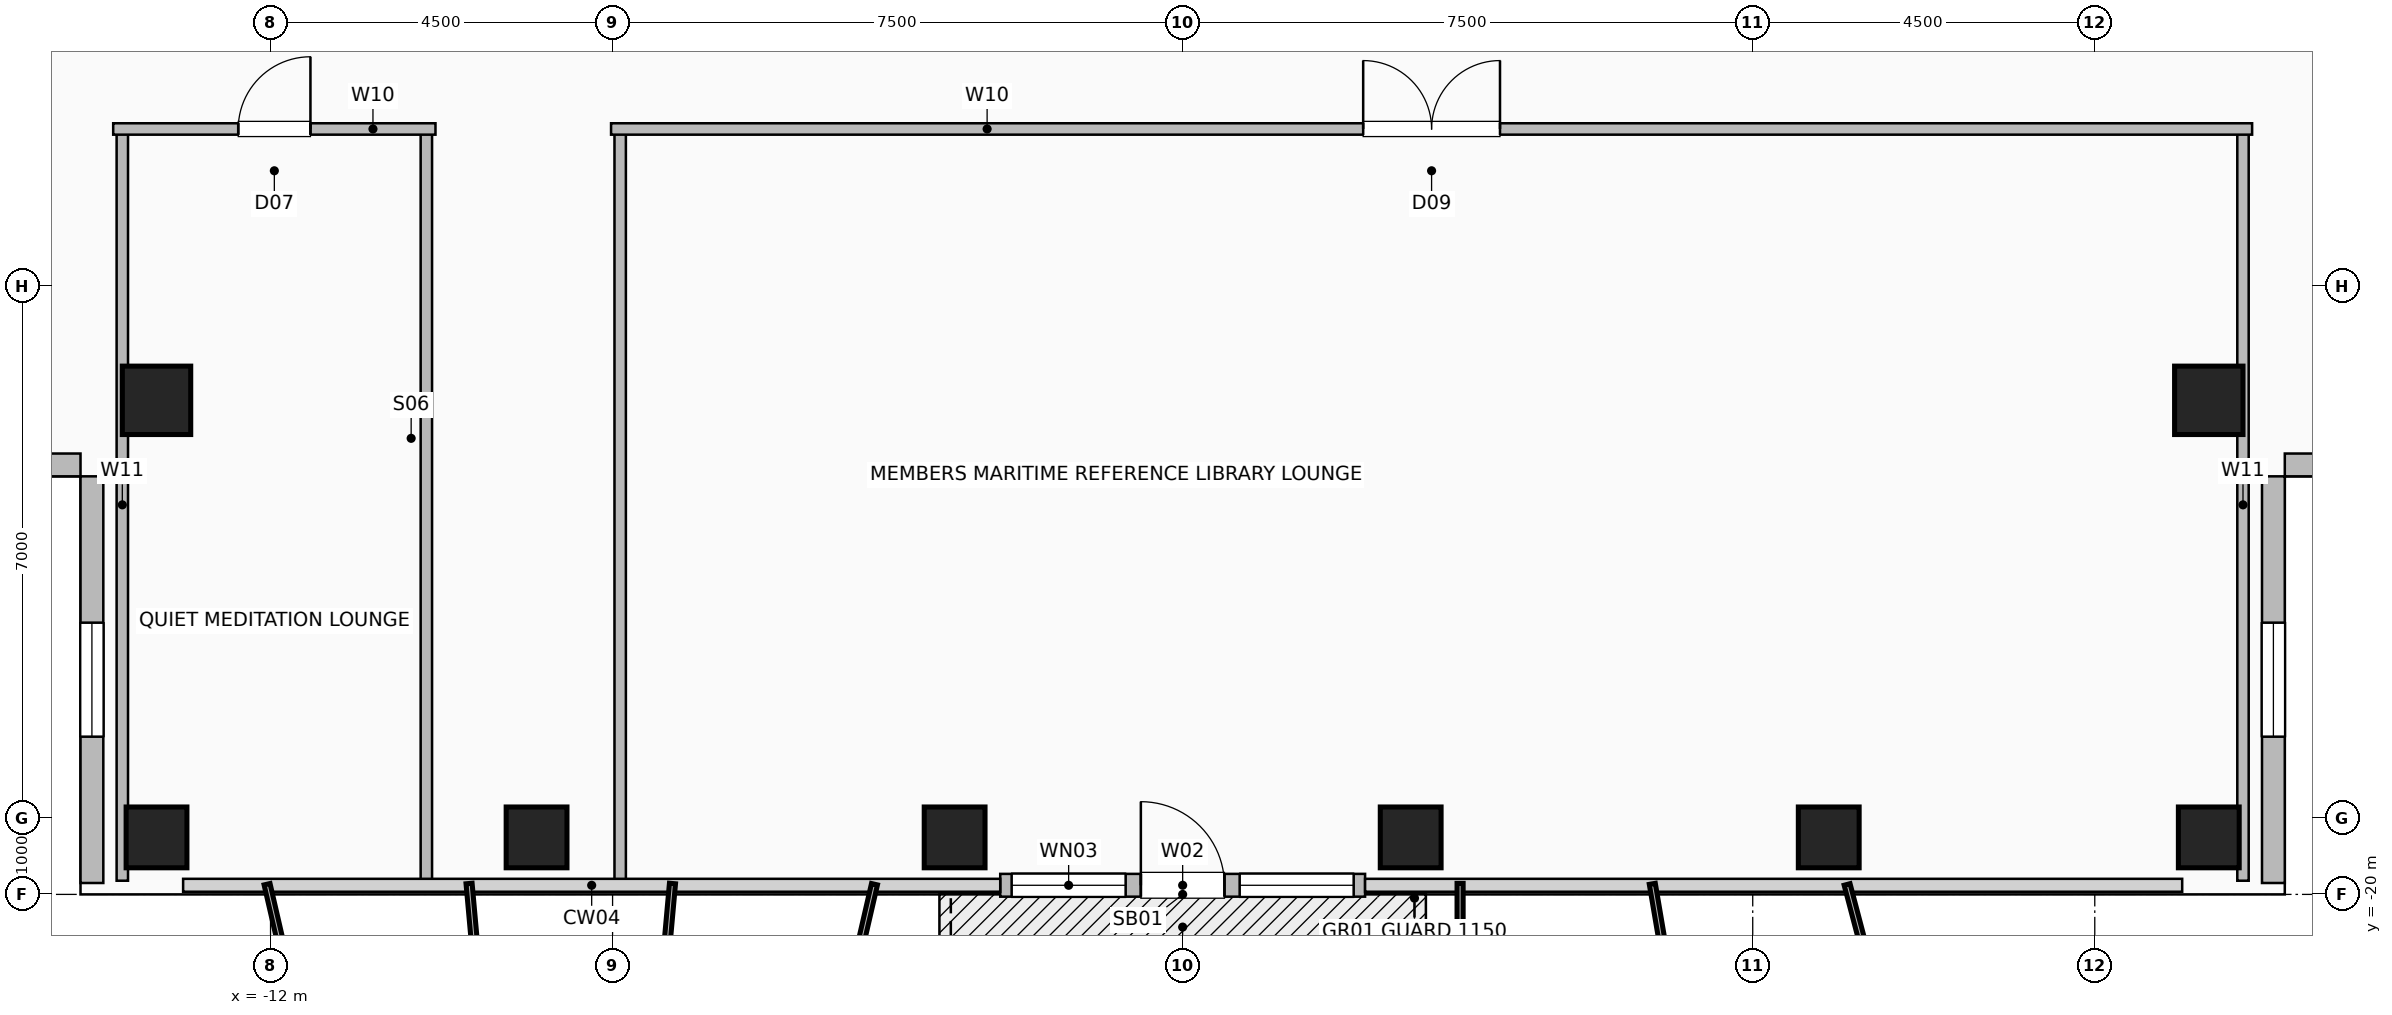
"""IFC4 building model, lengths in metres.
Left out: names, types, materials, properties, quantities, classifications, styles, units other than length and angle.
Written with IfcOpenShell. Run it as: python <this file> out.ifc"""

import sys

from ifc_helpers import new_model, si_unit, direction, frame, frame_2d, origin, origin_2d, place, context, subcontext, project, spatial, rectangle, hollow_rectangle, extrude, element, fill, save


model = new_model("IFC4")
c1 = context("Model", 3, precision=1e-05, world=origin(), true_north=direction((0.0, 1.0)))
c2 = subcontext(c1, "Body", "Model", "MODEL_VIEW")
j1 = project(units=[si_unit("LENGTHUNIT", "METRE"), si_unit("PLANEANGLEUNIT", "RADIAN")], contexts=[c1])
p1 = place(None, origin())
s1 = spatial("IfcSite", under=j1, at=p1, CompositionType="ELEMENT")
p2 = place(p1, origin())
s2 = spatial("IfcBuilding", under=s1, at=p2, CompositionType="ELEMENT")
p3 = place(p2, frame((0.0, 0.0, 205.8)))
s3 = spatial("IfcBuildingStorey", under=s2, at=p3, CompositionType="ELEMENT", Elevation=205.8)
for number, where, z_axis, x_axis in (
    (1, (-13.5, -19.25, 0.0), (0.0, 0.0, 1.0), (1.0, 0.0, 0.0)),
    (2, (-8.5, -19.25, 0.0), (0.0, 0.0, 1.0), (1.0, 0.0, 0.0)),
    (3, (-3.0, -19.25, 0.0), (0.0, 0.0, 1.0), (1.0, 0.0, 0.0)),
    (4, (3.0, -19.25, 0.0), (0.0, 0.0, 1.0), (1.0, 0.0, 0.0)),
    (5, (8.5, -19.25, 0.0), (0.0, 0.0, 1.0), (1.0, 0.0, 0.0)),
    (6, (13.5, -19.25, 0.0), (0.0, 0.0, 1.0), (1.0, 0.0, 0.0)),
):
    element("IfcColumn", number, at=place(p3, frame(where, z_axis=z_axis, x_axis=x_axis)), inside=s3, PredefinedType="COLUMN", context=c2, shape_type="SweptSolid", body=[
        extrude(hollow_rectangle(XDim=0.8, YDim=0.8, WallThickness=0.04, at=origin_2d()), origin(), (0.0, 0.0, 1.0), 3.6),
    ])
for number, where, z_axis, x_axis in (
    (7, (-13.5, -13.5, 0.0), (0.0, 0.0, 1.0), (1.0, 0.0, 0.0)),
    (8, (13.5, -13.5, 0.0), (0.0, 0.0, 1.0), (1.0, 0.0, 0.0)),
):
    element("IfcColumn", number, at=place(p3, frame(where, z_axis=z_axis, x_axis=x_axis)), inside=s3, PredefinedType="COLUMN", context=c2, shape_type="SweptSolid", body=[
        extrude(hollow_rectangle(XDim=0.9, YDim=0.9, WallThickness=0.045, at=origin_2d()), origin(), (0.0, 0.0, 1.0), 3.6),
    ])
p4 = place(p3, frame((-2.4, -19.88, 0.0), z_axis=(0.0, 0.0, 1.0), x_axis=(1.0, 0.0, 0.0)))
e9 = element("IfcWall", 9, at=p4, inside=s3, PredefinedType="SOLIDWALL", context=c2, shape_type="SweptSolid", body=[
    extrude(rectangle(XDim=4.8, YDim=0.3, at=frame_2d((2.4, 0.0))), origin(), (0.0, 0.0, 1.0), 3.36),
])
p5 = place(p4, frame((1.85, 0.0, 0.0)))
e10 = element("IfcOpeningElement", 10, at=p5, cuts=e9, PredefinedType="OPENING", context=c2, shape_type="SweptSolid", body=[
    extrude(rectangle(XDim=1.1, YDim=2.2, at=frame_2d((0.55, 1.1))), frame((0.0, 0.16, 0.0), z_axis=(0.0, -1.0, 0.0), x_axis=(1.0, 0.0, 0.0)), (0.0, 0.0, 1.0), 0.32),
])
p6 = place(p4, frame((0.15, 0.0, 0.85)))
e11 = element("IfcOpeningElement", 11, at=p6, cuts=e9, PredefinedType="OPENING", context=c2, shape_type="SweptSolid", body=[
    extrude(rectangle(XDim=1.5, YDim=1.8, at=frame_2d((0.75, 0.9))), frame((0.0, 0.16, 0.0), z_axis=(0.0, -1.0, 0.0), x_axis=(1.0, 0.0, 0.0)), (0.0, 0.0, 1.0), 0.32),
])
p7 = place(p4, frame((3.15, 0.0, 0.85)))
e12 = element("IfcOpeningElement", 12, at=p7, cuts=e9, PredefinedType="OPENING", context=c2, shape_type="SweptSolid", body=[
    extrude(rectangle(XDim=1.5, YDim=1.8, at=frame_2d((0.75, 0.9))), frame((0.0, 0.16, 0.0), z_axis=(0.0, -1.0, 0.0), x_axis=(1.0, 0.0, 0.0)), (0.0, 0.0, 1.0), 0.32),
])
p8 = place(p3, frame((-14.35, -19.85, 0.0), z_axis=(0.0, 0.0, 1.0), x_axis=(0.0, 1.0, 0.0)))
e13 = element("IfcWall", 13, at=p8, inside=s3, PredefinedType="SOLIDWALL", context=c2, shape_type="SweptSolid", body=[
    extrude(rectangle(XDim=5.35, YDim=0.3, at=frame_2d((2.675, 0.0))), origin(), (0.0, 0.0, 1.0), 3.36),
])
p9 = place(p8, frame((1.925, 0.0, 0.9)))
e14 = element("IfcOpeningElement", 14, at=p9, cuts=e13, PredefinedType="OPENING", context=c2, shape_type="SweptSolid", body=[
    extrude(rectangle(XDim=1.5, YDim=1.8, at=frame_2d((0.75, 0.9))), frame((0.0, 0.16, 0.0), z_axis=(0.0, -1.0, 0.0), x_axis=(1.0, 0.0, 0.0)), (0.0, 0.0, 1.0), 0.32),
])
p10 = place(p3, frame((-19.85, -14.35, 0.0), z_axis=(0.0, 0.0, 1.0), x_axis=(1.0, 0.0, 0.0)))
e15 = element("IfcWall", 15, at=p10, inside=s3, PredefinedType="SOLIDWALL", context=c2, shape_type="SweptSolid", body=[
    extrude(rectangle(XDim=5.35, YDim=0.3, at=frame_2d((2.675, 0.0))), origin(), (0.0, 0.0, 1.0), 3.36),
])
p11 = place(p3, frame((14.35, -19.85, 0.0), z_axis=(0.0, 0.0, 1.0), x_axis=(0.0, 1.0, 0.0)))
e16 = element("IfcWall", 16, at=p11, inside=s3, PredefinedType="SOLIDWALL", context=c2, shape_type="SweptSolid", body=[
    extrude(rectangle(XDim=5.35, YDim=0.3, at=frame_2d((2.675, 0.0))), origin(), (0.0, 0.0, 1.0), 3.36),
])
p12 = place(p11, frame((1.925, 0.0, 0.9)))
e17 = element("IfcOpeningElement", 17, at=p12, cuts=e16, PredefinedType="OPENING", context=c2, shape_type="SweptSolid", body=[
    extrude(rectangle(XDim=1.5, YDim=1.8, at=frame_2d((0.75, 0.9))), frame((0.0, 0.16, 0.0), z_axis=(0.0, -1.0, 0.0), x_axis=(1.0, 0.0, 0.0)), (0.0, 0.0, 1.0), 0.32),
])
p13 = place(p3, frame((19.85, -14.35, 0.0), z_axis=(0.0, 0.0, 1.0), x_axis=(-1.0, 0.0, 0.0)))
e18 = element("IfcWall", 18, at=p13, inside=s3, PredefinedType="SOLIDWALL", context=c2, shape_type="SweptSolid", body=[
    extrude(rectangle(XDim=5.35, YDim=0.3, at=frame_2d((2.675, 0.0))), origin(), (0.0, 0.0, 1.0), 3.36),
])
for number, where, z_axis, x_axis in (
    (19, (-13.95, -19.82, 0.0), (0.0, 0.0, 1.0), (0.0, 1.0, 0.0)),
    (20, (-9.95, -19.82, 0.0), (0.0, 0.0, 1.0), (0.0, 1.0, 0.0)),
):
    element("IfcWall", number, at=place(p3, frame(where, z_axis=z_axis, x_axis=x_axis)), inside=s3, PredefinedType="PARTITIONING", context=c2, shape_type="SweptSolid", body=[
        extrude(rectangle(XDim=9.89, YDim=0.15, at=frame_2d((4.945, 0.0))), origin(), (0.0, 0.0, 1.0), 3.36),
    ])
p14 = place(p3, frame((-14.07, -9.93, 0.0), z_axis=(0.0, 0.0, 1.0), x_axis=(1.0, 0.0, 0.0)))
e21 = element("IfcWall", 21, at=p14, inside=s3, PredefinedType="PARTITIONING", context=c2, shape_type="SweptSolid", body=[
    extrude(rectangle(XDim=4.24, YDim=0.15, at=frame_2d((2.12, 0.0))), origin(), (0.0, 0.0, 1.0), 3.36),
])
p15 = place(p14, frame((1.645, 0.0, 0.0)))
e22 = element("IfcOpeningElement", 22, at=p15, cuts=e21, PredefinedType="OPENING", context=c2, shape_type="SweptSolid", body=[
    extrude(rectangle(XDim=0.95, YDim=2.06, at=frame_2d((0.475, 1.03))), frame((0.0, 0.085, 0.0), z_axis=(0.0, -1.0, 0.0), x_axis=(1.0, 0.0, 0.0)), (0.0, 0.0, 1.0), 0.17),
])
for number, where, z_axis, x_axis in (
    (23, (-7.4, -19.82, 0.0), (0.0, 0.0, 1.0), (0.0, 1.0, 0.0)),
    (24, (13.95, -19.82, 0.0), (0.0, 0.0, 1.0), (0.0, 1.0, 0.0)),
):
    element("IfcWall", number, at=place(p3, frame(where, z_axis=z_axis, x_axis=x_axis)), inside=s3, PredefinedType="PARTITIONING", context=c2, shape_type="SweptSolid", body=[
        extrude(rectangle(XDim=9.89, YDim=0.15, at=frame_2d((4.945, 0.0))), origin(), (0.0, 0.0, 1.0), 3.36),
    ])
p16 = place(p3, frame((-7.52, -9.93, 0.0), z_axis=(0.0, 0.0, 1.0), x_axis=(1.0, 0.0, 0.0)))
e25 = element("IfcWall", 25, at=p16, inside=s3, PredefinedType="PARTITIONING", context=c2, shape_type="SweptSolid", body=[
    extrude(rectangle(XDim=21.59, YDim=0.15, at=frame_2d((10.795, 0.0))), origin(), (0.0, 0.0, 1.0), 3.36),
])
p17 = place(p16, frame((9.895, 0.0, 0.0)))
e26 = element("IfcOpeningElement", 26, at=p17, cuts=e25, PredefinedType="OPENING", context=c2, shape_type="SweptSolid", body=[
    extrude(rectangle(XDim=1.8, YDim=2.08, at=frame_2d((0.9, 1.04))), frame((0.0, 0.085, 0.0), z_axis=(0.0, -1.0, 0.0), x_axis=(1.0, 0.0, 0.0)), (0.0, 0.0, 1.0), 0.17),
])
p18 = place(p5, origin())
e27 = element("IfcDoor", 27, at=p18, inside=s3, OperationType="SINGLE_SWING_LEFT", PredefinedType="DOOR", context=c2, shape_type="SweptSolid", body=[
    extrude(rectangle(XDim=1.1, YDim=2.2, at=frame_2d((0.55, 1.1))), frame((0.0, 0.025, 0.0), z_axis=(0.0, -1.0, 0.0), x_axis=(1.0, 0.0, 0.0)), (0.0, 0.0, 1.0), 0.05),
])
fill(e10, e27)
p19 = place(p6, origin())
e28 = element("IfcWindow", 28, at=p19, inside=s3, PartitioningType="SINGLE_PANEL", PredefinedType="WINDOW", context=c2, shape_type="SweptSolid", body=[
    extrude(rectangle(XDim=1.5, YDim=1.8, at=frame_2d((0.75, 0.9))), frame((0.0, 0.03, 0.0), z_axis=(0.0, -1.0, 0.0), x_axis=(1.0, 0.0, 0.0)), (0.0, 0.0, 1.0), 0.06),
])
fill(e11, e28)
p20 = place(p7, origin())
e29 = element("IfcWindow", 29, at=p20, inside=s3, PartitioningType="SINGLE_PANEL", PredefinedType="WINDOW", context=c2, shape_type="SweptSolid", body=[
    extrude(rectangle(XDim=1.5, YDim=1.8, at=frame_2d((0.75, 0.9))), frame((0.0, 0.03, 0.0), z_axis=(0.0, -1.0, 0.0), x_axis=(1.0, 0.0, 0.0)), (0.0, 0.0, 1.0), 0.06),
])
fill(e12, e29)
p21 = place(p9, origin())
e30 = element("IfcWindow", 30, at=p21, inside=s3, PartitioningType="SINGLE_PANEL", PredefinedType="WINDOW", context=c2, shape_type="SweptSolid", body=[
    extrude(rectangle(XDim=1.5, YDim=1.8, at=frame_2d((0.75, 0.9))), frame((0.0, 0.03, 0.0), z_axis=(0.0, -1.0, 0.0), x_axis=(1.0, 0.0, 0.0)), (0.0, 0.0, 1.0), 0.06),
])
fill(e14, e30)
p22 = place(p12, origin())
e31 = element("IfcWindow", 31, at=p22, inside=s3, PartitioningType="SINGLE_PANEL", PredefinedType="WINDOW", context=c2, shape_type="SweptSolid", body=[
    extrude(rectangle(XDim=1.5, YDim=1.8, at=frame_2d((0.75, 0.9))), frame((0.0, 0.03, 0.0), z_axis=(0.0, -1.0, 0.0), x_axis=(1.0, 0.0, 0.0)), (0.0, 0.0, 1.0), 0.06),
])
fill(e17, e31)
p23 = place(p15, origin())
e32 = element("IfcDoor", 32, at=p23, inside=s3, OperationType="SINGLE_SWING_RIGHT", PredefinedType="DOOR", context=c2, shape_type="SweptSolid", body=[
    extrude(rectangle(XDim=0.95, YDim=2.06, at=frame_2d((0.475, 1.03))), frame((0.0, 0.025, 0.0), z_axis=(0.0, -1.0, 0.0), x_axis=(1.0, 0.0, 0.0)), (0.0, 0.0, 1.0), 0.05),
])
fill(e22, e32)
p24 = place(p17, origin())
e33 = element("IfcDoor", 33, at=p24, inside=s3, OperationType="DOUBLE_DOOR_SINGLE_SWING", PredefinedType="DOOR", context=c2, shape_type="SweptSolid", body=[
    extrude(rectangle(XDim=1.8, YDim=2.08, at=frame_2d((0.9, 1.04))), frame((0.0, 0.025, 0.0), z_axis=(0.0, -1.0, 0.0), x_axis=(1.0, 0.0, 0.0)), (0.0, 0.0, 1.0), 0.05),
])
fill(e26, e33)
save(model, sys.argv[1])
